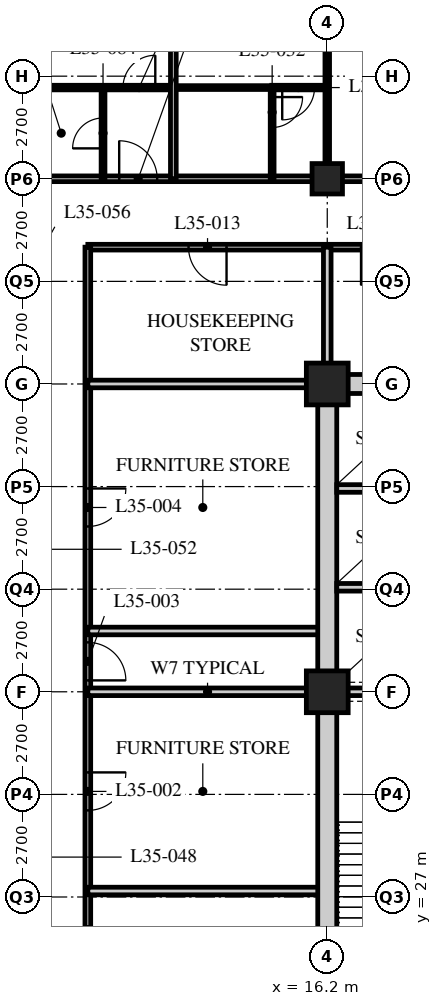
"""IFC4 building model, lengths in metres.
Left out: names, types, materials, properties, quantities, classifications, styles, units other than length and angle.
Written with IfcOpenShell. Run it as: python <this file> out.ifc"""

import sys

from ifc_helpers import new_model, si_unit, direction, frame, frame_2d, origin, origin_2d, place, context, subcontext, project, spatial, rectangle, hollow_rectangle, extrude, element, fill, save


model = new_model("IFC4")
c1 = context("Model", 3, precision=1e-05, world=origin(), true_north=direction((0.0, 1.0)))
c2 = subcontext(c1, "Body", "Model", "MODEL_VIEW")
j1 = project(units=[si_unit("LENGTHUNIT", "METRE"), si_unit("PLANEANGLEUNIT", "RADIAN")], contexts=[c1])
p1 = place(None, origin())
s1 = spatial("IfcSite", under=j1, at=p1, CompositionType="ELEMENT")
p2 = place(p1, origin())
s2 = spatial("IfcBuilding", under=s1, at=p2, CompositionType="ELEMENT")
p3 = place(p2, frame((0.0, 0.0, 137.4)))
s3 = spatial("IfcBuildingStorey", under=s2, at=p3, CompositionType="ELEMENT", Elevation=137.4)
for number, where, z_axis, x_axis in (
    (1, (16.2, 32.4, 0.0), (0.0, 0.0, 1.0), (1.0, 0.0, 0.0)),
    (2, (16.2, 40.5, 0.0), (0.0, 0.0, 1.0), (1.0, 0.0, 0.0)),
):
    element("IfcColumn", number, at=place(p3, frame(where, z_axis=z_axis, x_axis=x_axis)), inside=s3, PredefinedType="COLUMN", context=c2, shape_type="SweptSolid", body=[
        extrude(hollow_rectangle(XDim=1.1, YDim=1.1, WallThickness=0.1, at=origin_2d()), origin(), (0.0, 0.0, 1.0), 3.4),
    ])
p4 = place(p3, frame((16.2, 45.9, 0.0), z_axis=(0.0, 0.0, 1.0), x_axis=(1.0, 0.0, 0.0)))
e3 = element("IfcColumn", 3, at=p4, inside=s3, PredefinedType="COLUMN", context=c2, shape_type="SweptSolid", body=[
    extrude(hollow_rectangle(XDim=0.8, YDim=0.8, WallThickness=0.08, at=origin_2d()), origin(), (0.0, 0.0, 1.0), 3.4),
])
p5 = place(p3, frame((8.1, 45.9, 0.0), z_axis=(0.0, 0.0, 1.0), x_axis=(1.0, 0.0, 0.0)))
e4 = element("IfcWall", 4, at=p5, inside=s3, PredefinedType="PARTITIONING", context=c2, shape_type="SweptSolid", body=[
    extrude(rectangle(XDim=36.45, YDim=0.15, at=frame_2d((18.225, 0.0))), origin(), (0.0, 0.0, 1.0), 2.578),
])
p6 = place(p5, frame((9.625, 0.0, 0.0)))
e5 = element("IfcOpeningElement", 5, at=p6, cuts=e4, PredefinedType="OPENING", context=c2, shape_type="SweptSolid", body=[
    extrude(rectangle(XDim=1.0, YDim=2.1, at=frame_2d((0.5, 1.05))), frame((0.0, 0.085, 0.0), z_axis=(0.0, -1.0, 0.0), x_axis=(1.0, 0.0, 0.0)), (0.0, 0.0, 1.0), 0.17),
])
p7 = place(p5, frame((21.775, 0.0, 0.0)))
e6 = element("IfcOpeningElement", 6, at=p7, cuts=e4, PredefinedType="OPENING", context=c2, shape_type="SweptSolid", body=[
    extrude(rectangle(XDim=1.0, YDim=2.1, at=frame_2d((0.5, 1.05))), frame((0.0, 0.085, 0.0), z_axis=(0.0, -1.0, 0.0), x_axis=(1.0, 0.0, 0.0)), (0.0, 0.0, 1.0), 0.17),
])
p8 = place(p5, frame((28.95, 0.0, 0.0)))
e7 = element("IfcOpeningElement", 7, at=p8, cuts=e4, PredefinedType="OPENING", context=c2, shape_type="SweptSolid", body=[
    extrude(rectangle(XDim=1.0, YDim=2.1, at=frame_2d((0.5, 1.05))), frame((0.0, 0.085, 0.0), z_axis=(0.0, -1.0, 0.0), x_axis=(1.0, 0.0, 0.0)), (0.0, 0.0, 1.0), 0.17),
])
p9 = place(p5, frame((33.925, 0.0, 0.0)))
e8 = element("IfcOpeningElement", 8, at=p9, cuts=e4, PredefinedType="OPENING", context=c2, shape_type="SweptSolid", body=[
    extrude(rectangle(XDim=1.0, YDim=2.1, at=frame_2d((0.5, 1.05))), frame((0.0, 0.085, 0.0), z_axis=(0.0, -1.0, 0.0), x_axis=(1.0, 0.0, 0.0)), (0.0, 0.0, 1.0), 0.17),
])
p10 = place(p5, frame((2.625, 0.0, 0.0)))
e9 = element("IfcOpeningElement", 9, at=p10, cuts=e4, PredefinedType="OPENING", context=c2, shape_type="SweptSolid", body=[
    extrude(rectangle(XDim=1.0, YDim=2.1, at=frame_2d((0.5, 1.05))), frame((0.0, 0.085, 0.0), z_axis=(0.0, -1.0, 0.0), x_axis=(1.0, 0.0, 0.0)), (0.0, 0.0, 1.0), 0.17),
])
p11 = place(p3, frame((27.14, 44.1, 0.0), z_axis=(0.0, 0.0, 1.0), x_axis=(-1.0, 0.0, 0.0)))
e10 = element("IfcWall", 10, at=p11, inside=s3, PredefinedType="PARTITIONING", context=c2, shape_type="SweptSolid", body=[
    extrude(rectangle(XDim=17.24, YDim=0.15, at=frame_2d((8.62, 0.0))), origin(), (0.0, 0.0, 1.0), 3.19),
])
p12 = place(p11, frame((13.59, 0.0, 0.0)))
e11 = element("IfcOpeningElement", 11, at=p12, cuts=e10, PredefinedType="OPENING", context=c2, shape_type="SweptSolid", body=[
    extrude(rectangle(XDim=1.0, YDim=2.1, at=frame_2d((0.5, 1.05))), frame((0.0, 0.085, 0.0), z_axis=(0.0, -1.0, 0.0), x_axis=(1.0, 0.0, 0.0)), (0.0, 0.0, 1.0), 0.17),
])
p13 = place(p11, frame((9.051, 0.0, 0.0)))
e12 = element("IfcOpeningElement", 12, at=p13, cuts=e10, PredefinedType="OPENING", context=c2, shape_type="SweptSolid", body=[
    extrude(rectangle(XDim=1.0, YDim=2.1, at=frame_2d((0.5, 1.05))), frame((0.0, 0.085, 0.0), z_axis=(0.0, -1.0, 0.0), x_axis=(1.0, 0.0, 0.0)), (0.0, 0.0, 1.0), 0.17),
])
p14 = place(p11, frame((3.576, 0.0, 0.0)))
e13 = element("IfcOpeningElement", 13, at=p14, cuts=e10, PredefinedType="OPENING", context=c2, shape_type="SweptSolid", body=[
    extrude(rectangle(XDim=1.0, YDim=2.1, at=frame_2d((0.5, 1.05))), frame((0.0, 0.085, 0.0), z_axis=(0.0, -1.0, 0.0), x_axis=(1.0, 0.0, 0.0)), (0.0, 0.0, 1.0), 0.17),
])
p15 = place(p3, frame((9.9, 44.1, 0.0), z_axis=(0.0, 0.0, 1.0), x_axis=(0.0, -1.0, 0.0)))
e14 = element("IfcWall", 14, at=p15, inside=s3, PredefinedType="PARTITIONING", context=c2, shape_type="SweptSolid", body=[
    extrude(rectangle(XDim=24.75, YDim=0.15, at=frame_2d((12.375, 0.0))), origin(), (0.0, 0.0, 1.0), 3.19),
])
p16 = place(p15, frame((17.871, 0.0, 0.0)))
e15 = element("IfcOpeningElement", 15, at=p16, cuts=e14, PredefinedType="OPENING", context=c2, shape_type="SweptSolid", body=[
    extrude(rectangle(XDim=1.0, YDim=2.1, at=frame_2d((0.5, 1.05))), frame((0.0, 0.085, 0.0), z_axis=(0.0, -1.0, 0.0), x_axis=(1.0, 0.0, 0.0)), (0.0, 0.0, 1.0), 0.17),
])
p17 = place(p15, frame((13.821, 0.0, 0.0)))
e16 = element("IfcOpeningElement", 16, at=p17, cuts=e14, PredefinedType="OPENING", context=c2, shape_type="SweptSolid", body=[
    extrude(rectangle(XDim=1.0, YDim=2.1, at=frame_2d((0.5, 1.05))), frame((0.0, 0.085, 0.0), z_axis=(0.0, -1.0, 0.0), x_axis=(1.0, 0.0, 0.0)), (0.0, 0.0, 1.0), 0.17),
])
p18 = place(p15, frame((10.4, 0.0, 0.0)))
e17 = element("IfcOpeningElement", 17, at=p18, cuts=e14, PredefinedType="OPENING", context=c2, shape_type="SweptSolid", body=[
    extrude(rectangle(XDim=1.0, YDim=2.1, at=frame_2d((0.5, 1.05))), frame((0.0, 0.085, 0.0), z_axis=(0.0, -1.0, 0.0), x_axis=(1.0, 0.0, 0.0)), (0.0, 0.0, 1.0), 0.17),
])
p19 = place(p15, frame((6.35, 0.0, 0.0)))
e18 = element("IfcOpeningElement", 18, at=p19, cuts=e14, PredefinedType="OPENING", context=c2, shape_type="SweptSolid", body=[
    extrude(rectangle(XDim=1.0, YDim=2.1, at=frame_2d((0.5, 1.05))), frame((0.0, 0.085, 0.0), z_axis=(0.0, -1.0, 0.0), x_axis=(1.0, 0.0, 0.0)), (0.0, 0.0, 1.0), 0.17),
])
for number, where, z_axis, x_axis in (
    (19, (9.9, 32.4, 0.0), (0.0, 0.0, 1.0), (1.0, 0.0, 0.0)),
    (20, (9.9, 27.157, 0.0), (0.0, 0.0, 1.0), (1.0, 0.0, 0.0)),
    (21, (9.9, 34.0, 0.0), (0.0, 0.0, 1.0), (1.0, 0.0, 0.0)),
):
    element("IfcWall", number, at=place(p3, frame(where, z_axis=z_axis, x_axis=x_axis)), inside=s3, PredefinedType="SOLIDWALL", context=c2, shape_type="SweptSolid", body=[
        extrude(rectangle(XDim=6.3, YDim=0.2, at=frame_2d((3.15, 0.0))), origin(), (0.0, 0.0, 1.0), 3.19),
    ])
p20 = place(p3, frame((16.2, 40.5, 0.0), z_axis=(0.0, 0.0, 1.0), x_axis=(0.0, 1.0, 0.0)))
e22 = element("IfcWall", 22, at=p20, inside=s3, PredefinedType="SOLIDWALL", context=c2, shape_type="SweptSolid", body=[
    extrude(rectangle(XDim=3.6, YDim=0.2, at=frame_2d((1.8, 0.0))), origin(), (0.0, 0.0, 1.0), 2.578),
])
p21 = place(p3, frame((9.9, 40.5, 0.0), z_axis=(0.0, 0.0, 1.0), x_axis=(1.0, 0.0, 0.0)))
e23 = element("IfcWall", 23, at=p21, inside=s3, PredefinedType="SOLIDWALL", context=c2, shape_type="SweptSolid", body=[
    extrude(rectangle(XDim=6.3, YDim=0.2, at=frame_2d((3.15, 0.0))), origin(), (0.0, 0.0, 1.0), 3.19),
])
p22 = place(p3, frame((12.15, 48.3, 0.0), z_axis=(0.0, 0.0, 1.0), x_axis=(1.0, 0.0, 0.0)))
e24 = element("IfcWall", 24, at=p22, inside=s3, PredefinedType="PARTITIONING", context=c2, shape_type="SweptSolid", body=[
    extrude(rectangle(XDim=2.6, YDim=0.1, at=frame_2d((1.3, 0.0))), origin(), (0.0, 0.0, 1.0), 3.19),
])
p23 = place(p3, frame((14.75, 45.9, 0.0), z_axis=(0.0, 0.0, 1.0), x_axis=(0.0, 1.0, 0.0)))
e25 = element("IfcWall", 25, at=p23, inside=s3, PredefinedType="PARTITIONING", context=c2, shape_type="SweptSolid", body=[
    extrude(rectangle(XDim=2.4, YDim=0.1, at=frame_2d((1.2, 0.0))), origin(), (0.0, 0.0, 1.0), 3.19),
])
p24 = place(p23, frame((1.35, 0.0, 0.0)))
e26 = element("IfcOpeningElement", 26, at=p24, cuts=e25, PredefinedType="OPENING", context=c2, shape_type="SweptSolid", body=[
    extrude(rectangle(XDim=0.8, YDim=2.1, at=frame_2d((0.4, 1.05))), frame((0.0, 0.06, 0.0), z_axis=(0.0, -1.0, 0.0), x_axis=(1.0, 0.0, 0.0)), (0.0, 0.0, 1.0), 0.12),
])
p25 = place(p3, frame((16.2, 45.9, 0.0), z_axis=(0.0, 0.0, 1.0), x_axis=(0.0, 1.0, 0.0)))
e27 = element("IfcWall", 27, at=p25, inside=s3, PredefinedType="PARTITIONING", context=c2, shape_type="SweptSolid", body=[
    extrude(rectangle(XDim=7.8, YDim=0.12, at=frame_2d((3.9, 0.0))), origin(), (0.0, 0.0, 1.0), 2.578),
])
p26 = place(p25, frame((4.825, 0.0, 0.0)))
e28 = element("IfcOpeningElement", 28, at=p26, cuts=e27, PredefinedType="OPENING", context=c2, shape_type="SweptSolid", body=[
    extrude(rectangle(XDim=0.85, YDim=2.1, at=frame_2d((0.425, 1.05))), frame((0.0, 0.07, 0.0), z_axis=(0.0, -1.0, 0.0), x_axis=(1.0, 0.0, 0.0)), (0.0, 0.0, 1.0), 0.14),
])
p27 = place(p3, frame((8.1, 48.3, 0.0), z_axis=(0.0, 0.0, 1.0), x_axis=(1.0, 0.0, 0.0)))
e29 = element("IfcWall", 29, at=p27, inside=s3, PredefinedType="PARTITIONING", context=c2, shape_type="SweptSolid", body=[
    extrude(rectangle(XDim=4.05, YDim=0.12, at=frame_2d((2.025, 0.0))), origin(), (0.0, 0.0, 1.0), 3.19),
])
p28 = place(p27, frame((2.725, 0.0, 0.0)))
e30 = element("IfcOpeningElement", 30, at=p28, cuts=e29, PredefinedType="OPENING", context=c2, shape_type="SweptSolid", body=[
    extrude(rectangle(XDim=0.85, YDim=2.1, at=frame_2d((0.425, 1.05))), frame((0.0, 0.07, 0.0), z_axis=(0.0, -1.0, 0.0), x_axis=(1.0, 0.0, 0.0)), (0.0, 0.0, 1.0), 0.14),
])
p29 = place(p3, frame((10.3, 45.9, 0.0), z_axis=(0.0, 0.0, 1.0), x_axis=(0.0, 1.0, 0.0)))
e31 = element("IfcWall", 31, at=p29, inside=s3, PredefinedType="PARTITIONING", context=c2, shape_type="SweptSolid", body=[
    extrude(rectangle(XDim=2.4, YDim=0.1, at=frame_2d((1.2, 0.0))), origin(), (0.0, 0.0, 1.0), 3.19),
])
p30 = place(p29, frame((0.8, 0.0, 0.0)))
e32 = element("IfcOpeningElement", 32, at=p30, cuts=e31, PredefinedType="OPENING", context=c2, shape_type="SweptSolid", body=[
    extrude(rectangle(XDim=0.8, YDim=2.1, at=frame_2d((0.4, 1.05))), frame((0.0, 0.06, 0.0), z_axis=(0.0, -1.0, 0.0), x_axis=(1.0, 0.0, 0.0)), (0.0, 0.0, 1.0), 0.12),
])
p31 = place(p3, frame((12.15, 45.9, 0.0), z_axis=(0.0, 0.0, 1.0), x_axis=(0.0, 1.0, 0.0)))
e33 = element("IfcWall", 33, at=p31, inside=s3, PredefinedType="PARTITIONING", context=c2, shape_type="SweptSolid", body=[
    extrude(rectangle(XDim=7.8, YDim=0.15, at=frame_2d((3.9, 0.0))), origin(), (0.0, 0.0, 1.0), 3.19),
])
p32 = place(p3, frame((14.74, 48.3, 0.0), z_axis=(0.0, 0.0, 1.0), x_axis=(1.0, 0.0, 0.0)))
e34 = element("IfcWall", 34, at=p32, inside=s3, PredefinedType="PARTITIONING", context=c2, shape_type="SweptSolid", body=[
    extrude(rectangle(XDim=1.46, YDim=0.12, at=frame_2d((0.73, 0.0))), origin(), (0.0, 0.0, 1.0), 3.19),
])
p33 = place(p32, frame((0.275, 0.0, 0.0)))
e35 = element("IfcOpeningElement", 35, at=p33, cuts=e34, PredefinedType="OPENING", context=c2, shape_type="SweptSolid", body=[
    extrude(rectangle(XDim=0.85, YDim=2.1, at=frame_2d((0.425, 1.05))), frame((0.0, 0.07, 0.0), z_axis=(0.0, -1.0, 0.0), x_axis=(1.0, 0.0, 0.0)), (0.0, 0.0, 1.0), 0.14),
])
p34 = place(p3, frame((15.95, 40.5, 0.0), z_axis=(0.0, 0.0, 1.0), x_axis=(1.0, 0.0, 0.0)))
e36 = element("IfcWall", 36, at=p34, inside=s3, PredefinedType="SOLIDWALL", context=c2, shape_type="SweptSolid", body=[
    extrude(rectangle(XDim=24.8, YDim=0.5, at=frame_2d((12.4, 0.0))), origin(), (0.0, 0.0, 1.0), 2.54),
])
p35 = place(p34, frame((11.5, 0.0, 0.0)))
e37 = element("IfcOpeningElement", 37, at=p35, cuts=e36, PredefinedType="OPENING", context=c2, shape_type="SweptSolid", body=[
    extrude(rectangle(XDim=1.8, YDim=2.4, at=frame_2d((0.9, 1.2))), frame((0.0, 0.26, 0.0), z_axis=(0.0, -1.0, 0.0), x_axis=(1.0, 0.0, 0.0)), (0.0, 0.0, 1.0), 0.52),
])
p36 = place(p3, frame((16.2, 24.55, 0.0), z_axis=(0.0, 0.0, 1.0), x_axis=(0.0, 1.0, 0.0)))
e38 = element("IfcWall", 38, at=p36, inside=s3, PredefinedType="SOLIDWALL", context=c2, shape_type="SweptSolid", body=[
    extrude(rectangle(XDim=15.7, YDim=0.5, at=frame_2d((7.85, 0.0))), origin(), (0.0, 0.0, 1.0), 2.578),
])
p37 = place(p3, frame((16.45, 32.4, 0.0), z_axis=(0.0, 0.0, 1.0), x_axis=(1.0, 0.0, 0.0)))
e39 = element("IfcWall", 39, at=p37, inside=s3, PredefinedType="SOLIDWALL", context=c2, shape_type="SweptSolid", body=[
    extrude(rectangle(XDim=7.95, YDim=0.2, at=frame_2d((3.975, 0.0))), origin(), (0.0, 0.0, 1.0), 2.578),
])
for number, where, z_axis, x_axis in (
    (40, (16.45, 35.15, 0.0), (0.0, 0.0, 1.0), (1.0, 0.0, 0.0)),
    (41, (16.45, 37.75, 0.0), (0.0, 0.0, 1.0), (1.0, 0.0, 0.0)),
):
    element("IfcWall", number, at=place(p3, frame(where, z_axis=z_axis, x_axis=x_axis)), inside=s3, PredefinedType="SOLIDWALL", context=c2, shape_type="SweptSolid", body=[
        extrude(rectangle(XDim=2.6, YDim=0.2, at=frame_2d((1.3, 0.0))), origin(), (0.0, 0.0, 1.0), 3.19),
    ])
p38 = place(p17, origin())
e42 = element("IfcDoor", 42, at=p38, inside=s3, OperationType="SINGLE_SWING_LEFT", PredefinedType="DOOR", context=c2, shape_type="SweptSolid", body=[
    extrude(rectangle(XDim=1.0, YDim=2.1, at=frame_2d((0.5, 1.05))), frame((0.0, 0.025, 0.0), z_axis=(0.0, -1.0, 0.0), x_axis=(1.0, 0.0, 0.0)), (0.0, 0.0, 1.0), 0.05),
])
fill(e16, e42)
p39 = place(p18, origin())
e43 = element("IfcDoor", 43, at=p39, inside=s3, OperationType="SINGLE_SWING_RIGHT", PredefinedType="DOOR", context=c2, shape_type="SweptSolid", body=[
    extrude(rectangle(XDim=1.0, YDim=2.1, at=frame_2d((0.5, 1.05))), frame((0.0, 0.025, 0.0), z_axis=(0.0, -1.0, 0.0), x_axis=(1.0, 0.0, 0.0)), (0.0, 0.0, 1.0), 0.05),
])
fill(e17, e43)
p40 = place(p19, origin())
e44 = element("IfcDoor", 44, at=p40, inside=s3, OperationType="SINGLE_SWING_LEFT", PredefinedType="DOOR", context=c2, shape_type="SweptSolid", body=[
    extrude(rectangle(XDim=1.0, YDim=2.1, at=frame_2d((0.5, 1.05))), frame((0.0, 0.025, 0.0), z_axis=(0.0, -1.0, 0.0), x_axis=(1.0, 0.0, 0.0)), (0.0, 0.0, 1.0), 0.05),
])
fill(e18, e44)
p41 = place(p12, origin())
e45 = element("IfcDoor", 45, at=p41, inside=s3, OperationType="SINGLE_SWING_LEFT", PredefinedType="DOOR", context=c2, shape_type="SweptSolid", body=[
    extrude(rectangle(XDim=1.0, YDim=2.1, at=frame_2d((0.5, 1.05))), frame((0.0, 0.025, 0.0), z_axis=(0.0, -1.0, 0.0), x_axis=(1.0, 0.0, 0.0)), (0.0, 0.0, 1.0), 0.05),
])
fill(e11, e45)
p42 = place(p13, origin())
e46 = element("IfcDoor", 46, at=p42, inside=s3, OperationType="SINGLE_SWING_RIGHT", PredefinedType="DOOR", context=c2, shape_type="SweptSolid", body=[
    extrude(rectangle(XDim=1.0, YDim=2.1, at=frame_2d((0.5, 1.05))), frame((0.0, 0.025, 0.0), z_axis=(0.0, -1.0, 0.0), x_axis=(1.0, 0.0, 0.0)), (0.0, 0.0, 1.0), 0.05),
])
fill(e12, e46)
p43 = place(p24, origin())
e47 = element("IfcDoor", 47, at=p43, inside=s3, OperationType="SINGLE_SWING_LEFT", PredefinedType="DOOR", context=c2, shape_type="SweptSolid", body=[
    extrude(rectangle(XDim=0.8, YDim=2.1, at=frame_2d((0.4, 1.05))), frame((0.0, 0.025, 0.0), z_axis=(0.0, -1.0, 0.0), x_axis=(1.0, 0.0, 0.0)), (0.0, 0.0, 1.0), 0.05),
])
fill(e26, e47)
p44 = place(p30, origin())
e48 = element("IfcDoor", 48, at=p44, inside=s3, OperationType="SINGLE_SWING_LEFT", PredefinedType="DOOR", context=c2, shape_type="SweptSolid", body=[
    extrude(rectangle(XDim=0.8, YDim=2.1, at=frame_2d((0.4, 1.05))), frame((0.0, 0.025, 0.0), z_axis=(0.0, -1.0, 0.0), x_axis=(1.0, 0.0, 0.0)), (0.0, 0.0, 1.0), 0.05),
])
fill(e32, e48)
p45 = place(p10, origin())
e49 = element("IfcDoor", 49, at=p45, inside=s3, OperationType="SINGLE_SWING_LEFT", PredefinedType="DOOR", context=c2, shape_type="SweptSolid", body=[
    extrude(rectangle(XDim=1.0, YDim=2.1, at=frame_2d((0.5, 1.05))), frame((0.0, 0.025, 0.0), z_axis=(0.0, -1.0, 0.0), x_axis=(1.0, 0.0, 0.0)), (0.0, 0.0, 1.0), 0.05),
])
fill(e9, e49)
p46 = place(p28, origin())
e50 = element("IfcDoor", 50, at=p46, inside=s3, OperationType="SINGLE_SWING_RIGHT", PredefinedType="DOOR", context=c2, shape_type="SweptSolid", body=[
    extrude(rectangle(XDim=0.85, YDim=2.1, at=frame_2d((0.425, 1.05))), frame((0.0, 0.025, 0.0), z_axis=(0.0, -1.0, 0.0), x_axis=(1.0, 0.0, 0.0)), (0.0, 0.0, 1.0), 0.05),
])
fill(e30, e50)
p47 = place(p33, origin())
e51 = element("IfcDoor", 51, at=p47, inside=s3, OperationType="SINGLE_SWING_RIGHT", PredefinedType="DOOR", context=c2, shape_type="SweptSolid", body=[
    extrude(rectangle(XDim=0.85, YDim=2.1, at=frame_2d((0.425, 1.05))), frame((0.0, 0.025, 0.0), z_axis=(0.0, -1.0, 0.0), x_axis=(1.0, 0.0, 0.0)), (0.0, 0.0, 1.0), 0.05),
])
fill(e35, e51)
save(model, sys.argv[1])
